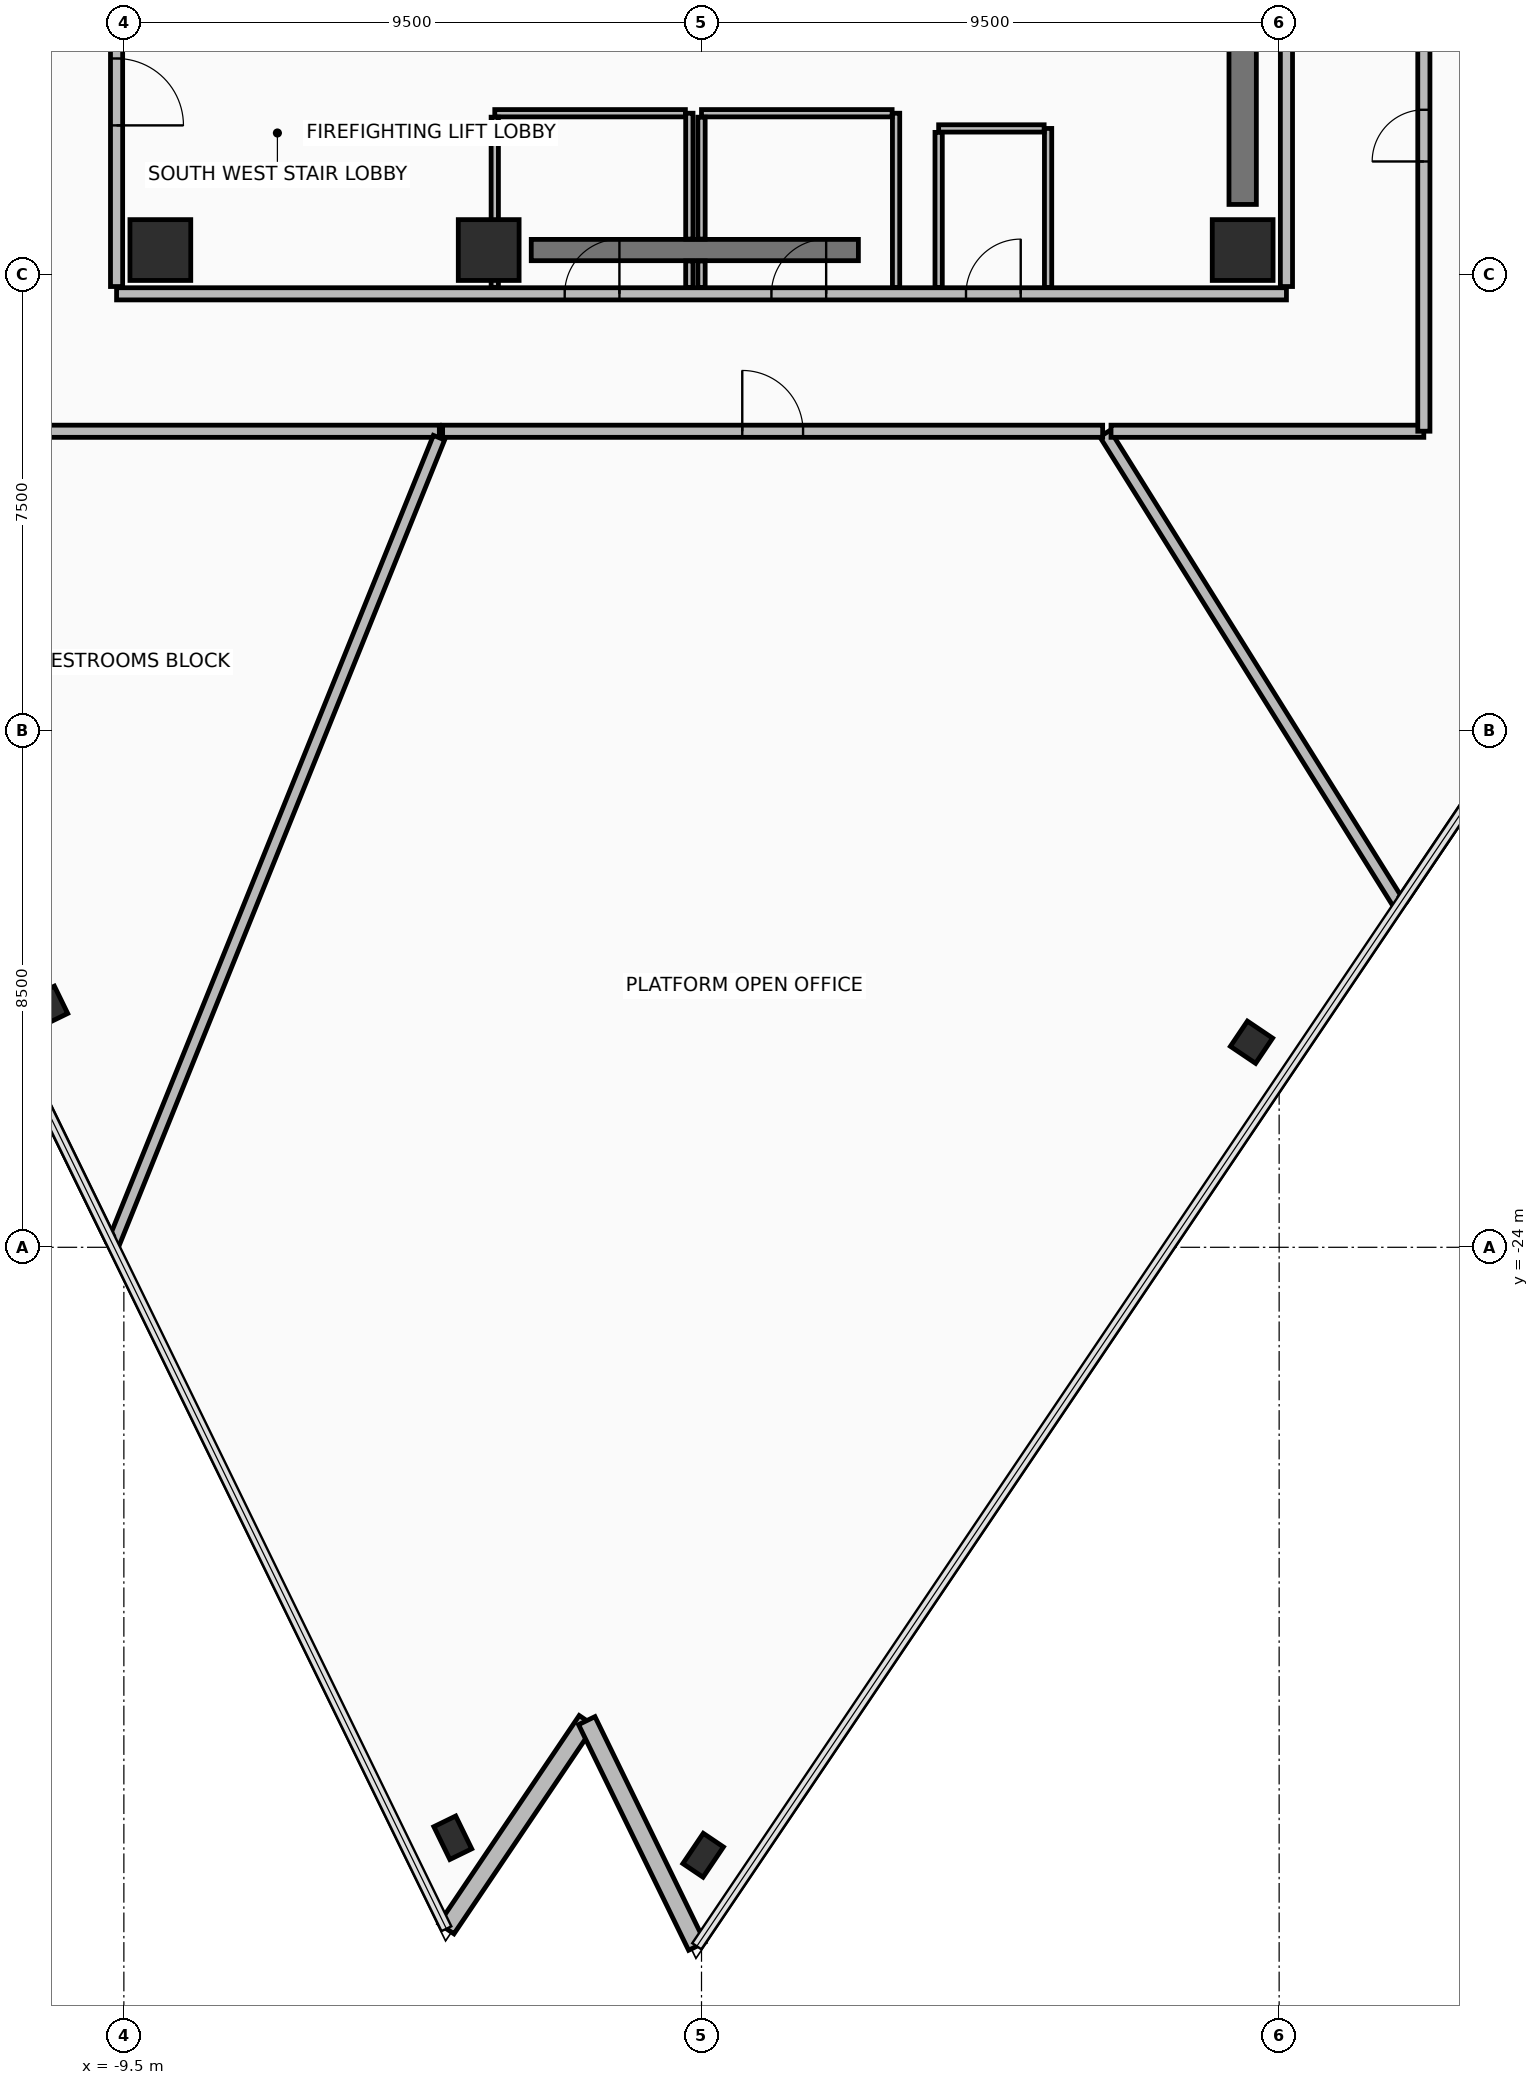
"""IFC4 building model, lengths in metres.
Left out: names, types, materials, properties, quantities, classifications, styles, units other than length and angle.
Written with IfcOpenShell. Run it as: python <this file> out.ifc"""

import sys

from ifc_helpers import new_model, si_unit, direction, frame, frame_2d, origin, origin_2d, place, context, subcontext, project, spatial, rectangle, hollow_rectangle, extrude, element, fill, save


model = new_model("IFC4")
c1 = context("Model", 3, precision=1e-05, world=origin(), true_north=direction((0.0, 1.0)))
c2 = subcontext(c1, "Body", "Model", "MODEL_VIEW")
j1 = project(units=[si_unit("LENGTHUNIT", "METRE"), si_unit("PLANEANGLEUNIT", "RADIAN")], contexts=[c1])
p1 = place(None, origin())
s1 = spatial("IfcSite", under=j1, at=p1, CompositionType="ELEMENT")
p2 = place(p1, origin())
s2 = spatial("IfcBuilding", under=s1, at=p2, CompositionType="ELEMENT")
p3 = place(p2, frame((0.0, 0.0, 248.65)))
s3 = spatial("IfcBuildingStorey", under=s2, at=p3, CompositionType="ELEMENT", Elevation=248.65)
for number, where, z_axis, x_axis in (
    (1, (-8.9, -7.6, 0.0), (0.0, 0.0, 1.0), (1.0, 0.0, 0.0)),
    (2, (-3.5, -7.6, 0.0), (0.0, 0.0, 1.0), (1.0, 0.0, 0.0)),
    (3, (8.9, -7.6, 0.0), (0.0, 0.0, 1.0), (1.0, 0.0, 0.0)),
):
    element("IfcColumn", number, at=place(p3, frame(where, z_axis=z_axis, x_axis=x_axis)), inside=s3, PredefinedType="COLUMN", context=c2, shape_type="SweptSolid", body=[
        extrude(rectangle(XDim=1.0, YDim=1.0, at=origin_2d()), origin(), (0.0, 0.0, 1.0), 4.75),
    ])
p4 = place(p3, frame((-10.758, -20.039, 0.0), z_axis=(0.0, 0.0, 1.0), x_axis=(-0.438371146789, 0.898794046299, 0.0)))
e4 = element("IfcColumn", 4, at=p4, inside=s3, PredefinedType="COLUMN", context=c2, shape_type="SweptSolid", body=[
    extrude(hollow_rectangle(XDim=0.5, YDim=0.5, WallThickness=0.032, at=origin_2d()), origin(), (0.0, 0.0, 1.0), 4.75),
])
for number, where, z_axis, x_axis in (
    (5, (-4.091, -33.71, 0.0), (0.0, 0.0, 1.0), (-0.438, 0.899, 0.0)),
    (6, (0.027, -33.998, 0.0), (0.0, 0.0, 1.0), (0.559, 0.829, 0.0)),
):
    element("IfcColumn", number, at=place(p3, frame(where, z_axis=z_axis, x_axis=x_axis)), inside=s3, PredefinedType="COLUMN", context=c2, shape_type="SweptSolid", body=[
        extrude(hollow_rectangle(XDim=0.4, YDim=0.6, WallThickness=0.03, at=origin_2d()), origin(), (0.0, 0.0, 1.0), 4.75),
    ])
p5 = place(p3, frame((9.046, -20.628, 0.0), z_axis=(0.0, 0.0, 1.0), x_axis=(0.559194350413, 0.829036596578, 0.0)))
e7 = element("IfcColumn", 7, at=p5, inside=s3, PredefinedType="COLUMN", context=c2, shape_type="SweptSolid", body=[
    extrude(hollow_rectangle(XDim=0.5, YDim=0.5, WallThickness=0.032, at=origin_2d()), origin(), (0.0, 0.0, 1.0), 4.75),
])
p6 = place(p3, frame((-4.195, -35.207, 0.0), z_axis=(0.0, 0.0, 1.0), x_axis=(0.559182319101, 0.829044711704, 0.0)))
e8 = element("IfcWall", 8, at=p6, inside=s3, PredefinedType="STANDARD", context=c2, shape_type="SweptSolid", body=[
    extrude(rectangle(XDim=4.128, YDim=0.3, at=frame_2d((2.064, 0.0))), origin(), (0.0, 0.0, 1.0), 2.255),
])
p7 = place(p3, frame((-1.887, -31.784, 0.0), z_axis=(0.0, 0.0, 1.0), x_axis=(0.438367699713, -0.898795727542, 0.0)))
e9 = element("IfcWall", 9, at=p7, inside=s3, PredefinedType="STANDARD", context=c2, shape_type="SweptSolid", body=[
    extrude(rectangle(XDim=4.128, YDim=0.3, at=frame_2d((2.064, 0.0))), origin(), (0.0, 0.0, 1.0), 2.255),
])
p8 = place(p3, frame((-2.8, -7.6, 0.0), z_axis=(0.0, 0.0, 1.0), x_axis=(1.0, 0.0, 0.0)))
e10 = element("IfcWall", 10, at=p8, inside=s3, PredefinedType="SHEAR", context=c2, shape_type="SweptSolid", body=[
    extrude(rectangle(XDim=5.38, YDim=0.35, at=frame_2d((2.69, 0.0))), origin(), (0.0, 0.0, 1.0), 4.56),
])
p9 = place(p3, frame((8.9, -6.85, 0.0), z_axis=(0.0, 0.0, 1.0), x_axis=(0.0, 1.0, 0.0)))
e11 = element("IfcWall", 11, at=p9, inside=s3, PredefinedType="SHEAR", context=c2, shape_type="SweptSolid", body=[
    extrude(rectangle(XDim=10.7, YDim=0.45, at=frame_2d((5.35, 0.0))), origin(), (0.0, 0.0, 1.0), 4.56),
])
p10 = place(p3, frame((-9.62, -8.32, 0.0), z_axis=(0.0, 0.0, 1.0), x_axis=(1.0, 0.0, 0.0)))
e12 = element("IfcWall", 12, at=p10, inside=s3, PredefinedType="PARTITIONING", context=c2, shape_type="SweptSolid", body=[
    extrude(rectangle(XDim=19.24, YDim=0.2, at=frame_2d((9.62, 0.0))), origin(), (0.0, 0.0, 1.0), 2.355),
])
p11 = place(p10, frame((7.37, 0.0, 0.0)))
e13 = element("IfcOpeningElement", 13, at=p11, cuts=e12, PredefinedType="OPENING", context=c2, shape_type="SweptSolid", body=[
    extrude(rectangle(XDim=0.9, YDim=2.1, at=frame_2d((0.45, 1.05))), frame((0.0, 0.11, 0.0), z_axis=(0.0, -1.0, 0.0), x_axis=(1.0, 0.0, 0.0)), (0.0, 0.0, 1.0), 0.22),
])
p12 = place(p10, frame((10.77, 0.0, 0.0)))
e14 = element("IfcOpeningElement", 14, at=p12, cuts=e12, PredefinedType="OPENING", context=c2, shape_type="SweptSolid", body=[
    extrude(rectangle(XDim=0.9, YDim=2.1, at=frame_2d((0.45, 1.05))), frame((0.0, 0.11, 0.0), z_axis=(0.0, -1.0, 0.0), x_axis=(1.0, 0.0, 0.0)), (0.0, 0.0, 1.0), 0.22),
])
p13 = place(p10, frame((13.97, 0.0, 0.0)))
e15 = element("IfcOpeningElement", 15, at=p13, cuts=e12, PredefinedType="OPENING", context=c2, shape_type="SweptSolid", body=[
    extrude(rectangle(XDim=0.9, YDim=2.1, at=frame_2d((0.45, 1.05))), frame((0.0, 0.11, 0.0), z_axis=(0.0, -1.0, 0.0), x_axis=(1.0, 0.0, 0.0)), (0.0, 0.0, 1.0), 0.22),
])
p14 = place(p3, frame((-9.62, 8.2, 0.0), z_axis=(0.0, 0.0, 1.0), x_axis=(0.0, -1.0, 0.0)))
e16 = element("IfcWall", 16, at=p14, inside=s3, PredefinedType="PARTITIONING", context=c2, shape_type="SweptSolid", body=[
    extrude(rectangle(XDim=16.4, YDim=0.2, at=frame_2d((8.2, 0.0))), origin(), (0.0, 0.0, 1.0), 2.355),
])
p15 = place(p14, frame((12.65, 0.0, 0.0)))
e17 = element("IfcOpeningElement", 17, at=p15, cuts=e16, PredefinedType="OPENING", context=c2, shape_type="SweptSolid", body=[
    extrude(rectangle(XDim=1.1, YDim=2.15, at=frame_2d((0.55, 1.075))), frame((0.0, 0.11, 0.0), z_axis=(0.0, -1.0, 0.0), x_axis=(1.0, 0.0, 0.0)), (0.0, 0.0, 1.0), 0.22),
])
p16 = place(p3, frame((9.62, -8.2, 0.0), z_axis=(0.0, 0.0, 1.0), x_axis=(0.0, 1.0, 0.0)))
e18 = element("IfcWall", 18, at=p16, inside=s3, PredefinedType="PARTITIONING", context=c2, shape_type="SweptSolid", body=[
    extrude(rectangle(XDim=16.4, YDim=0.2, at=frame_2d((8.2, 0.0))), origin(), (0.0, 0.0, 1.0), 2.355),
])
p17 = place(p16, frame((12.65, 0.0, 0.0)))
e19 = element("IfcOpeningElement", 19, at=p17, cuts=e18, PredefinedType="OPENING", context=c2, shape_type="SweptSolid", body=[
    extrude(rectangle(XDim=1.1, YDim=2.15, at=frame_2d((0.55, 1.075))), frame((0.0, 0.11, 0.0), z_axis=(0.0, -1.0, 0.0), x_axis=(1.0, 0.0, 0.0)), (0.0, 0.0, 1.0), 0.22),
])
p18 = place(p3, frame((-0.2, -8.215, 0.0), z_axis=(0.0, 0.0, 1.0), x_axis=(0.0, 1.0, 0.0)))
e20 = element("IfcWall", 20, at=p18, inside=s3, PredefinedType="PARTITIONING", context=c2, shape_type="SweptSolid", body=[
    extrude(rectangle(XDim=0.435, YDim=0.12, at=frame_2d((0.218, 0.0))), origin(), (0.0, 0.0, 1.0), 3.855),
])
p19 = place(p3, frame((-0.2, -7.42, 0.0), z_axis=(0.0, 0.0, 1.0), x_axis=(0.0, 1.0, 0.0)))
e21 = element("IfcWall", 21, at=p19, inside=s3, PredefinedType="PARTITIONING", context=c2, shape_type="SweptSolid", body=[
    extrude(rectangle(XDim=2.07, YDim=0.12, at=frame_2d((1.035, 0.0))), origin(), (0.0, 0.0, 1.0), 3.855),
])
p20 = place(p3, frame((-0.265, -5.35, 0.0), z_axis=(0.0, 0.0, 1.0), x_axis=(-1.0, 0.0, 0.0)))
e22 = element("IfcWall", 22, at=p20, inside=s3, PredefinedType="PARTITIONING", context=c2, shape_type="SweptSolid", body=[
    extrude(rectangle(XDim=3.135, YDim=0.12, at=frame_2d((1.567, 0.0))), origin(), (0.0, 0.0, 1.0), 3.855),
])
p21 = place(p3, frame((-3.4, -5.415, 0.0), z_axis=(0.0, 0.0, 1.0), x_axis=(0.0, -1.0, 0.0)))
e23 = element("IfcWall", 23, at=p21, inside=s3, PredefinedType="PARTITIONING", context=c2, shape_type="SweptSolid", body=[
    extrude(rectangle(XDim=2.8, YDim=0.12, at=frame_2d((1.4, 0.0))), origin(), (0.0, 0.0, 1.0), 2.355),
])
p22 = place(p3, frame((3.2, -8.215, 0.0), z_axis=(0.0, 0.0, 1.0), x_axis=(0.0, 1.0, 0.0)))
e24 = element("IfcWall", 24, at=p22, inside=s3, PredefinedType="PARTITIONING", context=c2, shape_type="SweptSolid", body=[
    extrude(rectangle(XDim=2.865, YDim=0.12, at=frame_2d((1.433, 0.0))), origin(), (0.0, 0.0, 1.0), 3.855),
])
p23 = place(p3, frame((3.135, -5.35, 0.0), z_axis=(0.0, 0.0, 1.0), x_axis=(-1.0, 0.0, 0.0)))
e25 = element("IfcWall", 25, at=p23, inside=s3, PredefinedType="PARTITIONING", context=c2, shape_type="SweptSolid", body=[
    extrude(rectangle(XDim=3.135, YDim=0.12, at=frame_2d((1.567, 0.0))), origin(), (0.0, 0.0, 1.0), 4.56),
])
p24 = place(p3, frame((0.0, -5.415, 0.0), z_axis=(0.0, 0.0, 1.0), x_axis=(0.0, -1.0, 0.0)))
e26 = element("IfcWall", 26, at=p24, inside=s3, PredefinedType="PARTITIONING", context=c2, shape_type="SweptSolid", body=[
    extrude(rectangle(XDim=2.005, YDim=0.12, at=frame_2d((1.002, 0.0))), origin(), (0.0, 0.0, 1.0), 3.855),
])
p25 = place(p3, frame((0.0, -7.78, 0.0), z_axis=(0.0, 0.0, 1.0), x_axis=(0.0, -1.0, 0.0)))
e27 = element("IfcWall", 27, at=p25, inside=s3, PredefinedType="PARTITIONING", context=c2, shape_type="SweptSolid", body=[
    extrude(rectangle(XDim=0.435, YDim=0.12, at=frame_2d((0.218, 0.0))), origin(), (0.0, 0.0, 1.0), 3.855),
])
p26 = place(p3, frame((5.7, -8.215, 0.0), z_axis=(0.0, 0.0, 1.0), x_axis=(0.0, 1.0, 0.0)))
e28 = element("IfcWall", 28, at=p26, inside=s3, PredefinedType="PARTITIONING", context=c2, shape_type="SweptSolid", body=[
    extrude(rectangle(XDim=2.615, YDim=0.12, at=frame_2d((1.308, 0.0))), origin(), (0.0, 0.0, 1.0), 3.855),
])
p27 = place(p3, frame((5.635, -5.6, 0.0), z_axis=(0.0, 0.0, 1.0), x_axis=(-1.0, 0.0, 0.0)))
e29 = element("IfcWall", 29, at=p27, inside=s3, PredefinedType="PARTITIONING", context=c2, shape_type="SweptSolid", body=[
    extrude(rectangle(XDim=1.735, YDim=0.12, at=frame_2d((0.868, 0.0))), origin(), (0.0, 0.0, 1.0), 4.56),
])
p28 = place(p3, frame((3.9, -5.665, 0.0), z_axis=(0.0, 0.0, 1.0), x_axis=(0.0, -1.0, 0.0)))
e30 = element("IfcWall", 30, at=p28, inside=s3, PredefinedType="PARTITIONING", context=c2, shape_type="SweptSolid", body=[
    extrude(rectangle(XDim=2.55, YDim=0.12, at=frame_2d((1.275, 0.0))), origin(), (0.0, 0.0, 1.0), 3.855),
])
p29 = place(p3, frame((-11.879, -10.58, 0.0), z_axis=(0.0, 0.0, 1.0), x_axis=(1.0, 0.0, 0.0)))
e31 = element("IfcWall", 31, at=p29, inside=s3, PredefinedType="PARTITIONING", context=c2, shape_type="SweptSolid", body=[
    extrude(rectangle(XDim=7.568, YDim=0.2, at=frame_2d((3.784, 0.0))), origin(), (0.0, 0.0, 1.0), 2.355),
])
p30 = place(p3, frame((-4.317, -10.685, 0.0), z_axis=(0.0, 0.0, 1.0), x_axis=(-0.374607677729, -0.927183416475, 0.0)))
e32 = element("IfcWall", 32, at=p30, inside=s3, PredefinedType="PARTITIONING", context=c2, shape_type="SweptSolid", body=[
    extrude(rectangle(XDim=14.318, YDim=0.2, at=frame_2d((7.159, 0.0))), origin(), (0.0, 0.0, 1.0), 2.255),
])
p31 = place(p3, frame((-9.742, -23.833, 0.0), z_axis=(0.0, 0.0, 1.0), x_axis=(-0.438371488373, 0.898793879697, 0.0)))
e33 = element("IfcWall", 33, at=p31, inside=s3, PredefinedType="PARTITIONING", context=c2, shape_type="SweptSolid", body=[
    extrude(rectangle(XDim=21.125, YDim=0.15, at=frame_2d((10.562, 0.0))), origin(), (0.0, 0.0, 1.0), 2.755),
])
p32 = place(p3, frame((11.476, -18.365, 0.0), z_axis=(0.0, 0.0, 1.0), x_axis=(-0.529938884519, 0.848035835726, 0.0)))
e34 = element("IfcWall", 34, at=p32, inside=s3, PredefinedType="PARTITIONING", context=c2, shape_type="SweptSolid", body=[
    extrude(rectangle(XDim=9.135, YDim=0.2, at=frame_2d((4.568, 0.0))), origin(), (0.0, 0.0, 1.0), 2.255),
])
p33 = place(p3, frame((6.735, -10.58, 0.0), z_axis=(0.0, 0.0, 1.0), x_axis=(1.0, 0.0, 0.0)))
e35 = element("IfcWall", 35, at=p33, inside=s3, PredefinedType="PARTITIONING", context=c2, shape_type="SweptSolid", body=[
    extrude(rectangle(XDim=5.145, YDim=0.2, at=frame_2d((2.572, 0.0))), origin(), (0.0, 0.0, 1.0), 2.755),
])
p34 = place(p3, frame((11.88, -10.579, 0.0), z_axis=(0.0, 0.0, 1.0), x_axis=(0.0, 1.0, 0.0)))
e36 = element("IfcWall", 36, at=p34, inside=s3, PredefinedType="PARTITIONING", context=c2, shape_type="SweptSolid", body=[
    extrude(rectangle(XDim=9.722, YDim=0.2, at=frame_2d((4.861, 0.0))), origin(), (0.0, 0.0, 1.0), 2.355),
])
p35 = place(p34, frame((4.436, 0.0, 0.0)))
e37 = element("IfcOpeningElement", 37, at=p35, cuts=e36, PredefinedType="OPENING", context=c2, shape_type="SweptSolid", body=[
    extrude(rectangle(XDim=0.85, YDim=2.1, at=frame_2d((0.425, 1.05))), frame((0.0, 0.11, 0.0), z_axis=(0.0, -1.0, 0.0), x_axis=(1.0, 0.0, 0.0)), (0.0, 0.0, 1.0), 0.22),
])
p36 = place(p3, frame((22.721, -1.694, 0.0), z_axis=(0.0, 0.0, 1.0), x_axis=(-0.559192024243, -0.829038165601, 0.0)))
e38 = element("IfcWall", 38, at=p36, inside=s3, PredefinedType="PARTITIONING", context=c2, shape_type="SweptSolid", body=[
    extrude(rectangle(XDim=19.995, YDim=0.15, at=frame_2d((9.998, 0.0))), origin(), (0.0, 0.0, 1.0), 4.56),
])
p37 = place(p3, frame((-4.258, -10.58, 0.0), z_axis=(0.0, 0.0, 1.0), x_axis=(1.0, 0.0, 0.0)))
e39 = element("IfcWall", 39, at=p37, inside=s3, PredefinedType="PARTITIONING", context=c2, shape_type="SweptSolid", body=[
    extrude(rectangle(XDim=10.855, YDim=0.2, at=frame_2d((5.428, 0.0))), origin(), (0.0, 0.0, 1.0), 2.355),
])
p38 = place(p37, frame((4.928, 0.0, 0.0)))
e40 = element("IfcOpeningElement", 40, at=p38, cuts=e39, PredefinedType="OPENING", context=c2, shape_type="SweptSolid", body=[
    extrude(rectangle(XDim=1.0, YDim=2.15, at=frame_2d((0.5, 1.075))), frame((0.0, 0.11, 0.0), z_axis=(0.0, -1.0, 0.0), x_axis=(1.0, 0.0, 0.0)), (0.0, 0.0, 1.0), 0.22),
])
p39 = place(p15, frame((1.1, 0.0, 0.0), z_axis=(0.0, 0.0, 1.0), x_axis=(-1.0, 0.0, 0.0)))
e41 = element("IfcDoor", 41, at=p39, inside=s3, OperationType="SINGLE_SWING_LEFT", PredefinedType="DOOR", context=c2, shape_type="SweptSolid", body=[
    extrude(rectangle(XDim=1.1, YDim=2.15, at=frame_2d((0.55, 1.075))), frame((0.0, 0.025, 0.0), z_axis=(0.0, -1.0, 0.0), x_axis=(1.0, 0.0, 0.0)), (0.0, 0.0, 1.0), 0.05),
])
fill(e17, e41)
p40 = place(p11, frame((0.9, 0.0, 0.0), z_axis=(0.0, 0.0, 1.0), x_axis=(-1.0, 0.0, 0.0)))
e42 = element("IfcDoor", 42, at=p40, inside=s3, OperationType="SINGLE_SWING_LEFT", PredefinedType="DOOR", context=c2, shape_type="SweptSolid", body=[
    extrude(rectangle(XDim=0.9, YDim=2.1, at=frame_2d((0.45, 1.05))), frame((0.0, 0.025, 0.0), z_axis=(0.0, -1.0, 0.0), x_axis=(1.0, 0.0, 0.0)), (0.0, 0.0, 1.0), 0.05),
])
fill(e13, e42)
p41 = place(p12, frame((0.9, 0.0, 0.0), z_axis=(0.0, 0.0, 1.0), x_axis=(-1.0, 0.0, 0.0)))
e43 = element("IfcDoor", 43, at=p41, inside=s3, OperationType="SINGLE_SWING_LEFT", PredefinedType="DOOR", context=c2, shape_type="SweptSolid", body=[
    extrude(rectangle(XDim=0.9, YDim=2.1, at=frame_2d((0.45, 1.05))), frame((0.0, 0.025, 0.0), z_axis=(0.0, -1.0, 0.0), x_axis=(1.0, 0.0, 0.0)), (0.0, 0.0, 1.0), 0.05),
])
fill(e14, e43)
p42 = place(p13, frame((0.9, 0.0, 0.0), z_axis=(0.0, 0.0, 1.0), x_axis=(-1.0, 0.0, 0.0)))
e44 = element("IfcDoor", 44, at=p42, inside=s3, OperationType="SINGLE_SWING_LEFT", PredefinedType="DOOR", context=c2, shape_type="SweptSolid", body=[
    extrude(rectangle(XDim=0.9, YDim=2.1, at=frame_2d((0.45, 1.05))), frame((0.0, 0.025, 0.0), z_axis=(0.0, -1.0, 0.0), x_axis=(1.0, 0.0, 0.0)), (0.0, 0.0, 1.0), 0.05),
])
fill(e15, e44)
p43 = place(p35, origin())
e45 = element("IfcDoor", 45, at=p43, inside=s3, OperationType="SINGLE_SWING_RIGHT", PredefinedType="DOOR", context=c2, shape_type="SweptSolid", body=[
    extrude(rectangle(XDim=0.85, YDim=2.1, at=frame_2d((0.425, 1.05))), frame((0.0, 0.025, 0.0), z_axis=(0.0, -1.0, 0.0), x_axis=(1.0, 0.0, 0.0)), (0.0, 0.0, 1.0), 0.05),
])
fill(e37, e45)
p44 = place(p38, origin())
e46 = element("IfcDoor", 46, at=p44, inside=s3, OperationType="SINGLE_SWING_RIGHT", PredefinedType="DOOR", context=c2, shape_type="SweptSolid", body=[
    extrude(rectangle(XDim=1.0, YDim=2.15, at=frame_2d((0.5, 1.075))), frame((0.0, 0.025, 0.0), z_axis=(0.0, -1.0, 0.0), x_axis=(1.0, 0.0, 0.0)), (0.0, 0.0, 1.0), 0.05),
])
fill(e40, e46)
save(model, sys.argv[1])
